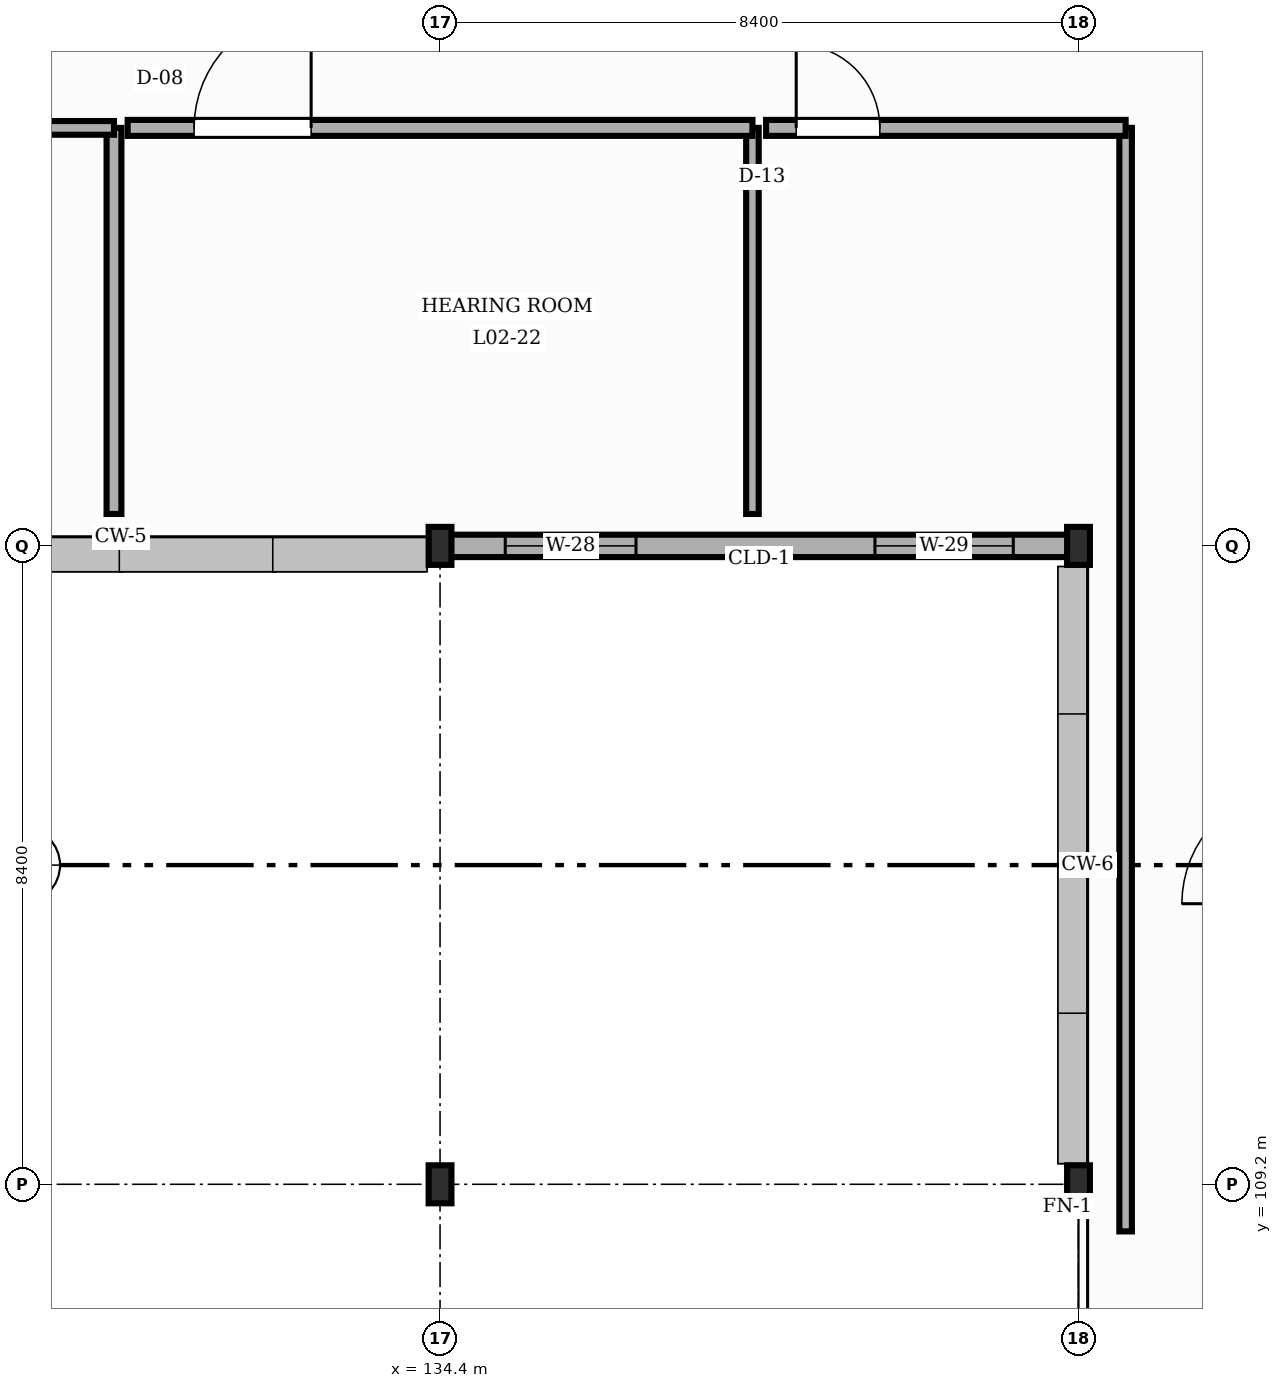
"""IFC4 building model, lengths in metres.
Left out: names, types, materials, properties, quantities, classifications, styles, units other than length and angle.
Written with IfcOpenShell. Run it as: python <this file> out.ifc"""

import sys

from ifc_helpers import new_model, si_unit, direction, frame, frame_2d, origin, origin_2d, place, context, subcontext, project, spatial, rectangle, i_section, extrude, element, fill, save


model = new_model("IFC4")
c1 = context("Model", 3, precision=1e-05, world=origin(), true_north=direction((0.0, 1.0)))
c2 = subcontext(c1, "Body", "Model", "MODEL_VIEW")
j1 = project(units=[si_unit("LENGTHUNIT", "METRE"), si_unit("PLANEANGLEUNIT", "RADIAN")], contexts=[c1])
p1 = place(None, origin())
s1 = spatial("IfcSite", under=j1, at=p1, CompositionType="ELEMENT")
p2 = place(p1, origin())
s2 = spatial("IfcBuilding", under=s1, at=p2, CompositionType="ELEMENT")
p3 = place(p2, frame((0.0, 0.0, 9.9)))
s3 = spatial("IfcBuildingStorey", under=s2, at=p3, CompositionType="ELEMENT", Elevation=9.9)
for number, where, z_axis, x_axis in (
    (1, (134.4, 109.2, 0.0), (0.0, 0.0, 1.0), (1.0, 0.0, 0.0)),
    (2, (134.4, 117.6, 0.0), (0.0, 0.0, 1.0), (1.0, 0.0, 0.0)),
    (3, (142.8, 109.2, 0.0), (0.0, 0.0, 1.0), (1.0, 0.0, 0.0)),
    (4, (142.8, 117.6, 0.0), (0.0, 0.0, 1.0), (1.0, 0.0, 0.0)),
):
    element("IfcColumn", number, at=place(p3, frame(where, z_axis=z_axis, x_axis=x_axis)), inside=s3, PredefinedType="COLUMN", context=c2, shape_type="SweptSolid", body=[
        extrude(i_section(OverallWidth=0.3, OverallDepth=0.5, WebThickness=0.014, FlangeThickness=0.028, FilletRadius=0.027, at=origin_2d()), origin(), (0.0, 0.0, 1.0), 4.05),
    ])
p4 = place(p3, frame((134.408, 117.6, 0.0), z_axis=(0.0, 0.0, 1.0), x_axis=(1.0, 0.0, 0.0)))
e5 = element("IfcWall", 5, at=p4, inside=s3, PredefinedType="STANDARD", context=c2, shape_type="SweptSolid", body=[
    extrude(rectangle(XDim=8.384, YDim=0.295, at=frame_2d((4.192, 0.0))), origin(), (0.0, 0.0, 1.0), 3.472),
])
p5 = place(p4, frame((0.85, 0.0, 0.9)))
e6 = element("IfcOpeningElement", 6, at=p5, cuts=e5, PredefinedType="OPENING", context=c2, shape_type="SweptSolid", body=[
    extrude(rectangle(XDim=1.72, YDim=1.45, at=frame_2d((0.86, 0.725))), frame((0.0, 0.157, 0.0), z_axis=(0.0, -1.0, 0.0), x_axis=(1.0, 0.0, 0.0)), (0.0, 0.0, 1.0), 0.315),
])
p6 = place(p4, frame((5.714, 0.0, 0.9)))
e7 = element("IfcOpeningElement", 7, at=p6, cuts=e5, PredefinedType="OPENING", context=c2, shape_type="SweptSolid", body=[
    extrude(rectangle(XDim=1.82, YDim=1.45, at=frame_2d((0.91, 0.725))), frame((0.0, 0.157, 0.0), z_axis=(0.0, -1.0, 0.0), x_axis=(1.0, 0.0, 0.0)), (0.0, 0.0, 1.0), 0.315),
])
p7 = place(p3, frame((130.11, 123.1, -0.004), z_axis=(0.0, 0.0, 1.0), x_axis=(0.0, -1.0, 0.0)))
e8 = element("IfcWall", 8, at=p7, inside=s3, PredefinedType="STANDARD", context=c2, shape_type="SweptSolid", body=[
    extrude(rectangle(XDim=5.08, YDim=0.195, at=frame_2d((2.54, 0.0))), origin(), (0.0, 0.0, 1.0), 3.844),
])
p8 = place(p3, frame((121.89, 123.1, -0.004), z_axis=(0.0, 0.0, 1.0), x_axis=(1.0, 0.0, 0.0)))
e9 = element("IfcWall", 9, at=p8, inside=s3, PredefinedType="STANDARD", context=c2, shape_type="SweptSolid", body=[
    extrude(rectangle(XDim=8.22, YDim=0.18, at=frame_2d((4.11, 0.0))), origin(), (0.0, 0.0, 1.0), 3.844),
])
p9 = place(p8, frame((0.944, 0.0, 0.0)))
e10 = element("IfcOpeningElement", 10, at=p9, cuts=e9, PredefinedType="OPENING", context=c2, shape_type="SweptSolid", body=[
    extrude(rectangle(XDim=1.4, YDim=2.06, at=frame_2d((0.7, 1.03))), frame((0.0, 0.1, 0.0), z_axis=(0.0, -1.0, 0.0), x_axis=(1.0, 0.0, 0.0)), (0.0, 0.0, 1.0), 0.2),
])
p10 = place(p3, frame((138.51, 123.1, -0.004), z_axis=(0.0, 0.0, 1.0), x_axis=(0.0, -1.0, 0.0)))
e11 = element("IfcWall", 11, at=p10, inside=s3, PredefinedType="STANDARD", context=c2, shape_type="SweptSolid", body=[
    extrude(rectangle(XDim=5.08, YDim=0.165, at=frame_2d((2.54, 0.0))), origin(), (0.0, 0.0, 1.0), 3.844),
])
p11 = place(p3, frame((130.29, 123.1, -0.004), z_axis=(0.0, 0.0, 1.0), x_axis=(1.0, 0.0, 0.0)))
e12 = element("IfcWall", 12, at=p11, inside=s3, PredefinedType="STANDARD", context=c2, shape_type="SweptSolid", body=[
    extrude(rectangle(XDim=8.22, YDim=0.21, at=frame_2d((4.11, 0.0))), origin(), (0.0, 0.0, 1.0), 3.844),
])
p12 = place(p11, frame((0.874, 0.0, 0.0)))
e13 = element("IfcOpeningElement", 13, at=p12, cuts=e12, PredefinedType="OPENING", context=c2, shape_type="SweptSolid", body=[
    extrude(rectangle(XDim=1.54, YDim=2.06, at=frame_2d((0.77, 1.03))), frame((0.0, 0.115, 0.0), z_axis=(0.0, -1.0, 0.0), x_axis=(1.0, 0.0, 0.0)), (0.0, 0.0, 1.0), 0.23),
])
p13 = place(p3, frame((143.42, 123.1, -0.004), z_axis=(0.0, 0.0, 1.0), x_axis=(0.0, -1.0, 0.0)))
e14 = element("IfcWall", 14, at=p13, inside=s3, PredefinedType="STANDARD", context=c2, shape_type="SweptSolid", body=[
    extrude(rectangle(XDim=14.52, YDim=0.165, at=frame_2d((7.26, 0.0))), origin(), (0.0, 0.0, 1.0), 3.844),
])
p14 = place(p3, frame((138.69, 123.1, -0.004), z_axis=(0.0, 0.0, 1.0), x_axis=(1.0, 0.0, 0.0)))
e15 = element("IfcWall", 15, at=p14, inside=s3, PredefinedType="STANDARD", context=c2, shape_type="SweptSolid", body=[
    extrude(rectangle(XDim=4.73, YDim=0.21, at=frame_2d((2.365, 0.0))), origin(), (0.0, 0.0, 1.0), 3.844),
])
p15 = place(p14, frame((0.396, 0.0, 0.0)))
e16 = element("IfcOpeningElement", 16, at=p15, cuts=e15, PredefinedType="OPENING", context=c2, shape_type="SweptSolid", body=[
    extrude(rectangle(XDim=1.1, YDim=2.14, at=frame_2d((0.55, 1.07))), frame((0.0, 0.115, 0.0), z_axis=(0.0, -1.0, 0.0), x_axis=(1.0, 0.0, 0.0)), (0.0, 0.0, 1.0), 0.23),
])
p16 = place(p5, origin())
e17 = element("IfcWindow", 17, at=p16, inside=s3, PartitioningType="SINGLE_PANEL", PredefinedType="WINDOW", context=c2, shape_type="SweptSolid", body=[
    extrude(rectangle(XDim=1.72, YDim=1.45, at=frame_2d((0.86, 0.725))), frame((0.0, 0.03, 0.0), z_axis=(0.0, -1.0, 0.0), x_axis=(1.0, 0.0, 0.0)), (0.0, 0.0, 1.0), 0.06),
])
fill(e6, e17)
p17 = place(p6, origin())
e18 = element("IfcWindow", 18, at=p17, inside=s3, PartitioningType="SINGLE_PANEL", PredefinedType="WINDOW", context=c2, shape_type="SweptSolid", body=[
    extrude(rectangle(XDim=1.82, YDim=1.45, at=frame_2d((0.91, 0.725))), frame((0.0, 0.03, 0.0), z_axis=(0.0, -1.0, 0.0), x_axis=(1.0, 0.0, 0.0)), (0.0, 0.0, 1.0), 0.06),
])
fill(e7, e18)
p18 = place(p12, origin())
e19 = element("IfcDoor", 19, at=p18, inside=s3, OperationType="SINGLE_SWING_RIGHT", PredefinedType="DOOR", context=c2, shape_type="SweptSolid", body=[
    extrude(rectangle(XDim=1.54, YDim=2.06, at=frame_2d((0.77, 1.03))), frame((0.0, 0.025, 0.0), z_axis=(0.0, -1.0, 0.0), x_axis=(1.0, 0.0, 0.0)), (0.0, 0.0, 1.0), 0.05),
])
fill(e13, e19)
p19 = place(p15, origin())
e20 = element("IfcDoor", 20, at=p19, inside=s3, OperationType="SINGLE_SWING_LEFT", PredefinedType="DOOR", context=c2, shape_type="SweptSolid", body=[
    extrude(rectangle(XDim=1.1, YDim=2.14, at=frame_2d((0.55, 1.07))), frame((0.0, 0.025, 0.0), z_axis=(0.0, -1.0, 0.0), x_axis=(1.0, 0.0, 0.0)), (0.0, 0.0, 1.0), 0.05),
])
fill(e16, e20)
save(model, sys.argv[1])
